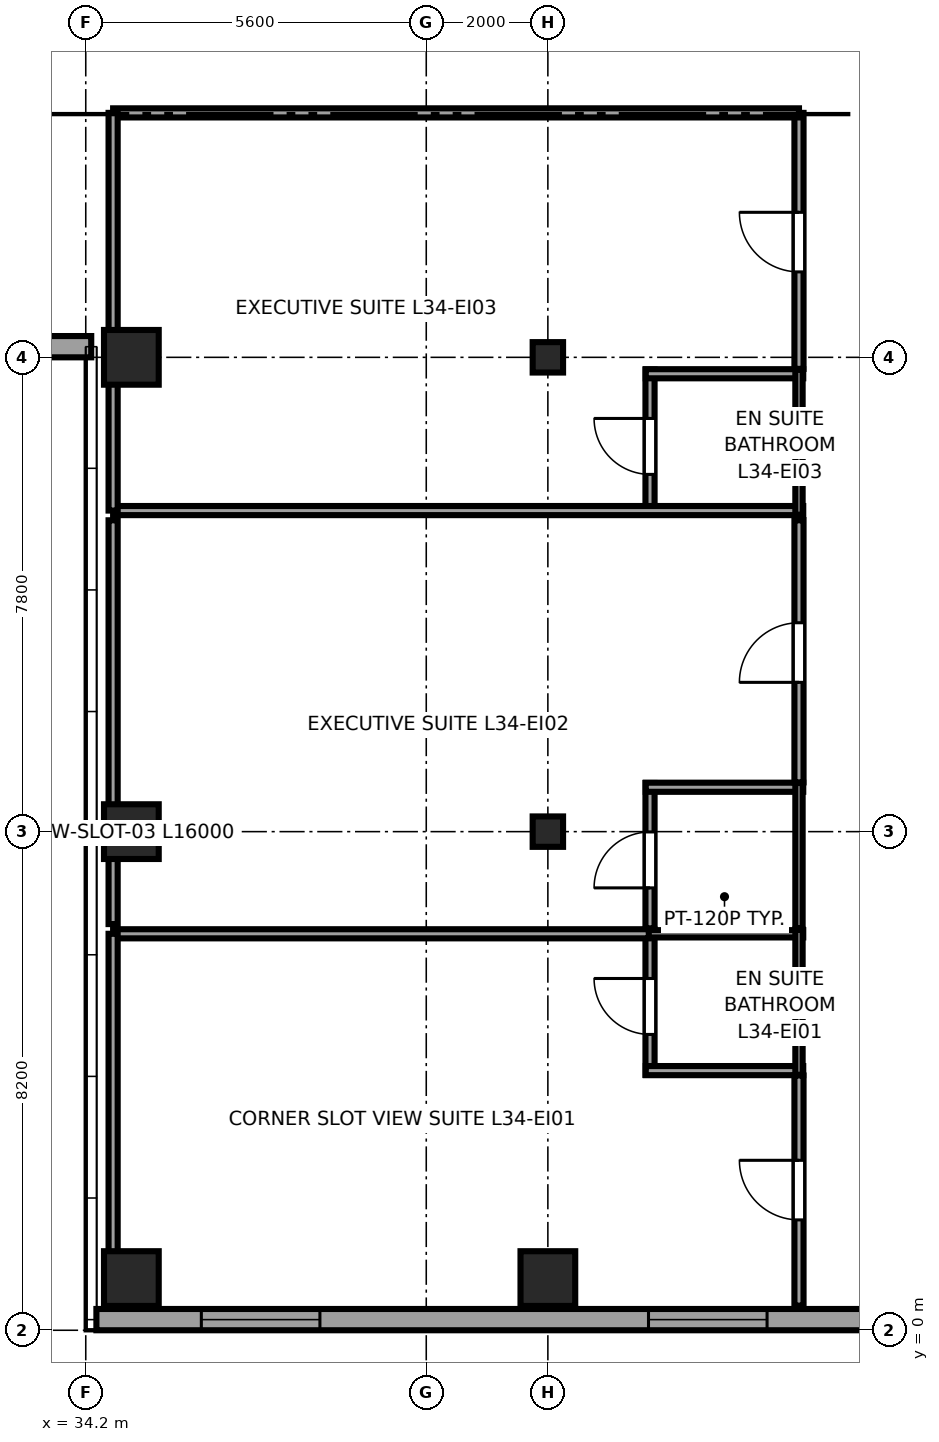
"""IFC4 building model, lengths in metres.
Left out: names, types, materials, properties, quantities, classifications, styles, units other than length and angle.
Written with IfcOpenShell. Run it as: python <this file> out.ifc"""

import sys

from ifc_helpers import new_model, si_unit, direction, frame, frame_2d, origin, origin_2d, place, context, subcontext, project, spatial, rectangle, i_section, extrude, source, transform, mapped, element, fill, save


model = new_model("IFC4")
c1 = context("Model", 3, precision=1e-05, world=origin(), true_north=direction((0.0, 1.0)))
c2 = subcontext(c1, "Body", "Model", "MODEL_VIEW")
j1 = project(units=[si_unit("LENGTHUNIT", "METRE"), si_unit("PLANEANGLEUNIT", "RADIAN")], contexts=[c1])
p1 = place(None, origin())
s1 = spatial("IfcSite", under=j1, at=p1, CompositionType="ELEMENT")
p2 = place(p1, origin())
s2 = spatial("IfcBuilding", under=s1, at=p2, CompositionType="ELEMENT")
p3 = place(p2, frame((0.0, 0.0, 132.85)))
s3 = spatial("IfcBuildingStorey", under=s2, at=p3, CompositionType="ELEMENT", Elevation=132.85)
m1 = source(origin(), c2, "Body", "SweptSolid", [
    extrude(rectangle(XDim=0.9, YDim=0.9, at=origin_2d()), origin(), (0.0, 0.0, 1.0), 3.55),
])
for number, where, z_axis, x_axis in (
    (1, (34.95, 0.85, 0.0), (0.0, 0.0, 1.0), (1.0, 0.0, 0.0)),
    (2, (34.95, 8.2, 0.0), (0.0, 0.0, 1.0), (1.0, 0.0, 0.0)),
    (3, (34.95, 16.0, 0.0), (0.0, 0.0, 1.0), (1.0, 0.0, 0.0)),
    (4, (41.8, 0.85, 0.0), (0.0, 0.0, 1.0), (1.0, 0.0, 0.0)),
):
    element("IfcColumn", number, at=place(p3, frame(where, z_axis=z_axis, x_axis=x_axis)), inside=s3, PredefinedType="COLUMN", context=c2, shape_type="MappedRepresentation", body=[
        mapped(m1, transform((0.0, 0.0, 0.0), x_axis=(1.0, 0.0, 0.0), y_axis=(0.0, 1.0, 0.0), z_axis=(0.0, 0.0, 1.0), scale=1.0)),
    ])
m2 = source(origin(), c2, "Body", "SweptSolid", [
    extrude(i_section(OverallWidth=0.5, OverallDepth=0.5, WebThickness=0.022, FlangeThickness=0.034, at=origin_2d()), origin(), (0.0, 0.0, 1.0), 3.55),
])
for number, where, z_axis, x_axis in (
    (5, (41.8, 8.2, 0.0), (0.0, 0.0, 1.0), (1.0, 0.0, 0.0)),
    (6, (41.8, 16.0, 0.0), (0.0, 0.0, 1.0), (1.0, 0.0, 0.0)),
):
    element("IfcColumn", number, at=place(p3, frame(where, z_axis=z_axis, x_axis=x_axis)), inside=s3, PredefinedType="COLUMN", context=c2, shape_type="MappedRepresentation", body=[
        mapped(m2, transform((0.0, 0.0, 0.0), x_axis=(1.0, 0.0, 0.0), y_axis=(0.0, 1.0, 0.0), z_axis=(0.0, 0.0, 1.0), scale=1.0)),
    ])
p4 = place(p3, frame((22.71, 16.175, 0.0), z_axis=(0.0, 0.0, 1.0), x_axis=(1.0, 0.0, 0.0)))
e7 = element("IfcWall", 7, at=p4, inside=s3, PredefinedType="SOLIDWALL", context=c2, shape_type="SweptSolid", body=[
    extrude(rectangle(XDim=11.58, YDim=0.35, at=frame_2d((5.79, 0.0))), origin(), (0.0, 0.0, 1.0), 2.748),
])
p5 = place(p4, frame((2.22, 0.0, 0.68)))
e8 = element("IfcOpeningElement", 8, at=p5, cuts=e7, PredefinedType="OPENING", context=c2, shape_type="SweptSolid", body=[
    extrude(rectangle(XDim=1.95, YDim=1.82, at=frame_2d((0.975, 0.91))), frame((0.0, 0.185, 0.0), z_axis=(0.0, -1.0, 0.0), x_axis=(1.0, 0.0, 0.0)), (0.0, 0.0, 1.0), 0.37),
])
p6 = place(p4, frame((7.41, 0.0, 0.68)))
e9 = element("IfcOpeningElement", 9, at=p6, cuts=e7, PredefinedType="OPENING", context=c2, shape_type="SweptSolid", body=[
    extrude(rectangle(XDim=1.95, YDim=1.82, at=frame_2d((0.975, 0.91))), frame((0.0, 0.185, 0.0), z_axis=(0.0, -1.0, 0.0), x_axis=(1.0, 0.0, 0.0)), (0.0, 0.0, 1.0), 0.37),
])
p7 = place(p3, frame((34.375, 0.175, 0.0), z_axis=(0.0, 0.0, 1.0), x_axis=(1.0, 0.0, 0.0)))
e10 = element("IfcWall", 10, at=p7, inside=s3, PredefinedType="SOLIDWALL", context=c2, shape_type="SweptSolid", body=[
    extrude(rectangle(XDim=18.008, YDim=0.35, at=frame_2d((9.004, 0.0))), origin(), (0.0, 0.0, 1.0), 3.37),
])
p8 = place(p7, frame((1.726, 0.0, 0.68)))
e11 = element("IfcOpeningElement", 11, at=p8, cuts=e10, PredefinedType="OPENING", context=c2, shape_type="SweptSolid", body=[
    extrude(rectangle(XDim=1.95, YDim=1.82, at=frame_2d((0.975, 0.91))), frame((0.0, 0.185, 0.0), z_axis=(0.0, -1.0, 0.0), x_axis=(1.0, 0.0, 0.0)), (0.0, 0.0, 1.0), 0.37),
])
p9 = place(p7, frame((9.08, 0.0, 0.68)))
e12 = element("IfcOpeningElement", 12, at=p9, cuts=e10, PredefinedType="OPENING", context=c2, shape_type="SweptSolid", body=[
    extrude(rectangle(XDim=1.95, YDim=1.82, at=frame_2d((0.975, 0.91))), frame((0.0, 0.185, 0.0), z_axis=(0.0, -1.0, 0.0), x_axis=(1.0, 0.0, 0.0)), (0.0, 0.0, 1.0), 0.37),
])
p10 = place(p7, frame((14.991, 0.0, 0.62)))
e13 = element("IfcOpeningElement", 13, at=p10, cuts=e10, PredefinedType="OPENING", context=c2, shape_type="SweptSolid", body=[
    extrude(rectangle(XDim=1.5, YDim=1.55, at=frame_2d((0.75, 0.775))), frame((0.0, 0.185, 0.0), z_axis=(0.0, -1.0, 0.0), x_axis=(1.0, 0.0, 0.0)), (0.0, 0.0, 1.0), 0.37),
])
p11 = place(p3, frame((43.48, 4.2, 0.0), z_axis=(0.0, 0.0, 1.0), x_axis=(0.0, 1.0, 0.0)))
e14 = element("IfcWall", 14, at=p11, inside=s3, PredefinedType="PARTITIONING", context=c2, shape_type="SweptSolid", body=[
    extrude(rectangle(XDim=2.39, YDim=0.15, at=frame_2d((1.195, 0.0))), origin(), (0.0, 0.0, 1.0), 3.37),
])
p12 = place(p11, frame((0.665, 0.0, 0.0)))
e15 = element("IfcOpeningElement", 15, at=p12, cuts=e14, PredefinedType="OPENING", context=c2, shape_type="SweptSolid", body=[
    extrude(rectangle(XDim=0.92, YDim=2.01, at=frame_2d((0.46, 1.005))), frame((0.0, 0.085, 0.0), z_axis=(0.0, -1.0, 0.0), x_axis=(1.0, 0.0, 0.0)), (0.0, 0.0, 1.0), 0.17),
])
p13 = place(p3, frame((43.41, 4.27, 0.0), z_axis=(0.0, 0.0, 1.0), x_axis=(1.0, 0.0, 0.0)))
e16 = element("IfcWall", 16, at=p13, inside=s3, PredefinedType="PARTITIONING", context=c2, shape_type="SweptSolid", body=[
    extrude(rectangle(XDim=2.59, YDim=0.15, at=frame_2d((1.295, 0.0))), origin(), (0.0, 0.0, 1.0), 3.37),
])
p14 = place(p3, frame((43.41, 6.52, 0.0), z_axis=(0.0, 0.0, 1.0), x_axis=(1.0, 0.0, 0.0)))
e17 = element("IfcWall", 17, at=p14, inside=s3, PredefinedType="PLUMBINGWALL", context=c2, shape_type="SweptSolid", body=[
    extrude(rectangle(XDim=2.59, YDim=0.12, at=frame_2d((1.295, 0.0))), origin(), (0.0, 0.0, 1.0), 3.37),
])
p15 = place(p3, frame((45.93, 4.2, 0.0), z_axis=(0.0, 0.0, 1.0), x_axis=(0.0, 1.0, 0.0)))
e18 = element("IfcWall", 18, at=p15, inside=s3, PredefinedType="PLUMBINGWALL", context=c2, shape_type="SweptSolid", body=[
    extrude(rectangle(XDim=2.39, YDim=0.12, at=frame_2d((1.195, 0.0))), origin(), (0.0, 0.0, 1.0), 3.37),
])
p16 = place(p3, frame((43.48, 6.61, 0.0), z_axis=(0.0, 0.0, 1.0), x_axis=(0.0, 1.0, 0.0)))
e19 = element("IfcWall", 19, at=p16, inside=s3, PredefinedType="PARTITIONING", context=c2, shape_type="SweptSolid", body=[
    extrude(rectangle(XDim=2.39, YDim=0.15, at=frame_2d((1.195, 0.0))), origin(), (0.0, 0.0, 1.0), 3.37),
])
p17 = place(p16, frame((0.665, 0.0, 0.0)))
e20 = element("IfcOpeningElement", 20, at=p17, cuts=e19, PredefinedType="OPENING", context=c2, shape_type="SweptSolid", body=[
    extrude(rectangle(XDim=0.92, YDim=2.01, at=frame_2d((0.46, 1.005))), frame((0.0, 0.085, 0.0), z_axis=(0.0, -1.0, 0.0), x_axis=(1.0, 0.0, 0.0)), (0.0, 0.0, 1.0), 0.17),
])
p18 = place(p3, frame((43.41, 8.93, 0.0), z_axis=(0.0, 0.0, 1.0), x_axis=(1.0, 0.0, 0.0)))
e21 = element("IfcWall", 21, at=p18, inside=s3, PredefinedType="PARTITIONING", context=c2, shape_type="SweptSolid", body=[
    extrude(rectangle(XDim=2.59, YDim=0.15, at=frame_2d((1.295, 0.0))), origin(), (0.0, 0.0, 1.0), 3.37),
])
p19 = place(p3, frame((45.93, 6.61, 0.0), z_axis=(0.0, 0.0, 1.0), x_axis=(0.0, 1.0, 0.0)))
e22 = element("IfcWall", 22, at=p19, inside=s3, PredefinedType="PLUMBINGWALL", context=c2, shape_type="SweptSolid", body=[
    extrude(rectangle(XDim=2.39, YDim=0.12, at=frame_2d((1.195, 0.0))), origin(), (0.0, 0.0, 1.0), 3.37),
])
p20 = place(p3, frame((43.48, 13.41, 0.0), z_axis=(0.0, 0.0, 1.0), x_axis=(0.0, 1.0, 0.0)))
e23 = element("IfcWall", 23, at=p20, inside=s3, PredefinedType="PARTITIONING", context=c2, shape_type="SweptSolid", body=[
    extrude(rectangle(XDim=2.39, YDim=0.15, at=frame_2d((1.195, 0.0))), origin(), (0.0, 0.0, 1.0), 3.37),
])
p21 = place(p20, frame((0.665, 0.0, 0.0)))
e24 = element("IfcOpeningElement", 24, at=p21, cuts=e23, PredefinedType="OPENING", context=c2, shape_type="SweptSolid", body=[
    extrude(rectangle(XDim=0.92, YDim=2.01, at=frame_2d((0.46, 1.005))), frame((0.0, 0.085, 0.0), z_axis=(0.0, -1.0, 0.0), x_axis=(1.0, 0.0, 0.0)), (0.0, 0.0, 1.0), 0.17),
])
p22 = place(p3, frame((34.65, 13.48, 0.0), z_axis=(0.0, 0.0, 1.0), x_axis=(1.0, 0.0, 0.0)))
e25 = element("IfcWall", 25, at=p22, inside=s3, PredefinedType="PARTITIONING", context=c2, shape_type="SweptSolid", body=[
    extrude(rectangle(XDim=11.35, YDim=0.15, at=frame_2d((5.675, 0.0))), origin(), (0.0, 0.0, 1.0), 3.37),
])
p23 = place(p3, frame((43.41, 15.73, 0.0), z_axis=(0.0, 0.0, 1.0), x_axis=(1.0, 0.0, 0.0)))
e26 = element("IfcWall", 26, at=p23, inside=s3, PredefinedType="PARTITIONING", context=c2, shape_type="SweptSolid", body=[
    extrude(rectangle(XDim=2.59, YDim=0.15, at=frame_2d((1.295, 0.0))), origin(), (0.0, 0.0, 1.0), 3.37),
])
p24 = place(p3, frame((45.93, 13.41, 0.0), z_axis=(0.0, 0.0, 1.0), x_axis=(0.0, 1.0, 0.0)))
e27 = element("IfcWall", 27, at=p24, inside=s3, PredefinedType="PLUMBINGWALL", context=c2, shape_type="SweptSolid", body=[
    extrude(rectangle(XDim=2.39, YDim=0.12, at=frame_2d((1.195, 0.0))), origin(), (0.0, 0.0, 1.0), 3.37),
])
p25 = place(p3, frame((45.93, 0.405, 0.0), z_axis=(0.0, 0.0, 1.0), x_axis=(0.0, 1.0, 0.0)))
e28 = element("IfcWall", 28, at=p25, inside=s3, PredefinedType="PARTITIONING", context=c2, shape_type="SweptSolid", body=[
    extrude(rectangle(XDim=3.785, YDim=0.15, at=frame_2d((1.893, 0.0))), origin(), (0.0, 0.0, 1.0), 3.37),
])
p26 = place(p25, frame((1.41, 0.0, 0.0)))
e29 = element("IfcOpeningElement", 29, at=p26, cuts=e28, PredefinedType="OPENING", context=c2, shape_type="SweptSolid", body=[
    extrude(rectangle(XDim=0.98, YDim=2.12, at=frame_2d((0.49, 1.06))), frame((0.0, 0.085, 0.0), z_axis=(0.0, -1.0, 0.0), x_axis=(1.0, 0.0, 0.0)), (0.0, 0.0, 1.0), 0.17),
])
p27 = place(p3, frame((34.65, 6.52, 0.0), z_axis=(0.0, 0.0, 1.0), x_axis=(1.0, 0.0, 0.0)))
e30 = element("IfcWall", 30, at=p27, inside=s3, PredefinedType="PARTITIONING", context=c2, shape_type="SweptSolid", body=[
    extrude(rectangle(XDim=8.81, YDim=0.15, at=frame_2d((4.405, 0.0))), origin(), (0.0, 0.0, 1.0), 3.37),
])
p28 = place(p3, frame((34.65, 0.405, 0.0), z_axis=(0.0, 0.0, 1.0), x_axis=(0.0, 1.0, 0.0)))
e31 = element("IfcWall", 31, at=p28, inside=s3, PredefinedType="PARTITIONING", context=c2, shape_type="SweptSolid", body=[
    extrude(rectangle(XDim=6.115, YDim=0.15, at=frame_2d((3.058, 0.0))), origin(), (0.0, 0.0, 1.0), 3.37),
])
p29 = place(p3, frame((45.93, 9.01, 0.0), z_axis=(0.0, 0.0, 1.0), x_axis=(0.0, 1.0, 0.0)))
e32 = element("IfcWall", 32, at=p29, inside=s3, PredefinedType="PARTITIONING", context=c2, shape_type="SweptSolid", body=[
    extrude(rectangle(XDim=4.31, YDim=0.15, at=frame_2d((2.155, 0.0))), origin(), (0.0, 0.0, 1.0), 3.37),
])
p30 = place(p29, frame((1.645, 0.0, 0.0)))
e33 = element("IfcOpeningElement", 33, at=p30, cuts=e32, PredefinedType="OPENING", context=c2, shape_type="SweptSolid", body=[
    extrude(rectangle(XDim=0.98, YDim=2.12, at=frame_2d((0.49, 1.06))), frame((0.0, 0.085, 0.0), z_axis=(0.0, -1.0, 0.0), x_axis=(1.0, 0.0, 0.0)), (0.0, 0.0, 1.0), 0.17),
])
p31 = place(p3, frame((34.65, 6.68, 0.0), z_axis=(0.0, 0.0, 1.0), x_axis=(0.0, 1.0, 0.0)))
e34 = element("IfcWall", 34, at=p31, inside=s3, PredefinedType="PARTITIONING", context=c2, shape_type="SweptSolid", body=[
    extrude(rectangle(XDim=6.64, YDim=0.15, at=frame_2d((3.32, 0.0))), origin(), (0.0, 0.0, 1.0), 3.37),
])
p32 = place(p3, frame((45.93, 15.81, 0.0), z_axis=(0.0, 0.0, 1.0), x_axis=(0.0, 1.0, 0.0)))
e35 = element("IfcWall", 35, at=p32, inside=s3, PredefinedType="PARTITIONING", context=c2, shape_type="SweptSolid", body=[
    extrude(rectangle(XDim=4.21, YDim=0.15, at=frame_2d((2.105, 0.0))), origin(), (0.0, 0.0, 1.0), 3.37),
])
p33 = place(p32, frame((1.595, 0.0, 0.0)))
e36 = element("IfcOpeningElement", 36, at=p33, cuts=e35, PredefinedType="OPENING", context=c2, shape_type="SweptSolid", body=[
    extrude(rectangle(XDim=0.98, YDim=2.12, at=frame_2d((0.49, 1.06))), frame((0.0, 0.085, 0.0), z_axis=(0.0, -1.0, 0.0), x_axis=(1.0, 0.0, 0.0)), (0.0, 0.0, 1.0), 0.17),
])
p34 = place(p3, frame((34.65, 20.02, 0.0), z_axis=(0.0, 0.0, 1.0), x_axis=(1.0, 0.0, 0.0)))
e37 = element("IfcWall", 37, at=p34, inside=s3, PredefinedType="PARTITIONING", context=c2, shape_type="SweptSolid", body=[
    extrude(rectangle(XDim=11.28, YDim=0.15, at=frame_2d((5.64, 0.0))), origin(), (0.0, 0.0, 1.0), 2.954),
])
p35 = place(p3, frame((34.65, 13.48, 0.0), z_axis=(0.0, 0.0, 1.0), x_axis=(0.0, 1.0, 0.0)))
e38 = element("IfcWall", 38, at=p35, inside=s3, PredefinedType="PARTITIONING", context=c2, shape_type="SweptSolid", body=[
    extrude(rectangle(XDim=6.54, YDim=0.15, at=frame_2d((3.27, 0.0))), origin(), (0.0, 0.0, 1.0), 3.37),
])
m3 = source(origin(), c2, "Body", "SweptSolid", [
    extrude(rectangle(XDim=1.95, YDim=1.82, at=frame_2d((0.975, 0.91))), frame((0.0, 0.09, 0.0), z_axis=(0.0, -1.0, 0.0), x_axis=(1.0, 0.0, 0.0)), (0.0, 0.0, 1.0), 0.06),
])
p36 = place(p8, origin())
e39 = element("IfcWindow", 39, at=p36, inside=s3, PartitioningType="DOUBLE_PANEL_VERTICAL", PredefinedType="WINDOW", context=c2, shape_type="MappedRepresentation", body=[
    mapped(m3, transform((0.0, 0.0, 0.0), x_axis=(1.0, 0.0, 0.0), y_axis=(0.0, 1.0, 0.0), z_axis=(0.0, 0.0, 1.0), scale=1.0)),
])
fill(e11, e39)
p37 = place(p9, origin())
e40 = element("IfcWindow", 40, at=p37, inside=s3, PartitioningType="DOUBLE_PANEL_VERTICAL", PredefinedType="WINDOW", context=c2, shape_type="MappedRepresentation", body=[
    mapped(m3, transform((0.0, 0.0, 0.0), x_axis=(1.0, 0.0, 0.0), y_axis=(0.0, 1.0, 0.0), z_axis=(0.0, 0.0, 1.0), scale=1.0)),
])
fill(e12, e40)
m4 = source(origin(), c2, "Body", "SweptSolid", [
    extrude(rectangle(XDim=0.92, YDim=2.01, at=frame_2d((0.46, 1.005))), frame((0.0, 0.025, 0.0), z_axis=(0.0, -1.0, 0.0), x_axis=(1.0, 0.0, 0.0)), (0.0, 0.0, 1.0), 0.05),
])
p38 = place(p12, origin())
e41 = element("IfcDoor", 41, at=p38, inside=s3, OperationType="SINGLE_SWING_RIGHT", PredefinedType="DOOR", context=c2, shape_type="MappedRepresentation", body=[
    mapped(m4, transform((0.0, 0.0, 0.0), x_axis=(1.0, 0.0, 0.0), y_axis=(0.0, 1.0, 0.0), z_axis=(0.0, 0.0, 1.0), scale=1.0)),
])
fill(e15, e41)
p39 = place(p17, origin())
e42 = element("IfcDoor", 42, at=p39, inside=s3, OperationType="SINGLE_SWING_LEFT", PredefinedType="DOOR", context=c2, shape_type="MappedRepresentation", body=[
    mapped(m4, transform((0.0, 0.0, 0.0), x_axis=(1.0, 0.0, 0.0), y_axis=(0.0, 1.0, 0.0), z_axis=(0.0, 0.0, 1.0), scale=1.0)),
])
fill(e20, e42)
p40 = place(p21, origin())
e43 = element("IfcDoor", 43, at=p40, inside=s3, OperationType="SINGLE_SWING_RIGHT", PredefinedType="DOOR", context=c2, shape_type="MappedRepresentation", body=[
    mapped(m4, transform((0.0, 0.0, 0.0), x_axis=(1.0, 0.0, 0.0), y_axis=(0.0, 1.0, 0.0), z_axis=(0.0, 0.0, 1.0), scale=1.0)),
])
fill(e24, e43)
m5 = source(origin(), c2, "Body", "SweptSolid", [
    extrude(rectangle(XDim=0.98, YDim=2.12, at=frame_2d((0.49, 1.06))), frame((0.0, 0.025, 0.0), z_axis=(0.0, -1.0, 0.0), x_axis=(1.0, 0.0, 0.0)), (0.0, 0.0, 1.0), 0.05),
])
p41 = place(p26, origin())
e44 = element("IfcDoor", 44, at=p41, inside=s3, OperationType="SINGLE_SWING_RIGHT", PredefinedType="DOOR", context=c2, shape_type="MappedRepresentation", body=[
    mapped(m5, transform((0.0, 0.0, 0.0), x_axis=(1.0, 0.0, 0.0), y_axis=(0.0, 1.0, 0.0), z_axis=(0.0, 0.0, 1.0), scale=1.0)),
])
fill(e29, e44)
p42 = place(p30, origin())
e45 = element("IfcDoor", 45, at=p42, inside=s3, OperationType="SINGLE_SWING_LEFT", PredefinedType="DOOR", context=c2, shape_type="MappedRepresentation", body=[
    mapped(m5, transform((0.0, 0.0, 0.0), x_axis=(1.0, 0.0, 0.0), y_axis=(0.0, 1.0, 0.0), z_axis=(0.0, 0.0, 1.0), scale=1.0)),
])
fill(e33, e45)
p43 = place(p33, origin())
e46 = element("IfcDoor", 46, at=p43, inside=s3, OperationType="SINGLE_SWING_RIGHT", PredefinedType="DOOR", context=c2, shape_type="MappedRepresentation", body=[
    mapped(m5, transform((0.0, 0.0, 0.0), x_axis=(1.0, 0.0, 0.0), y_axis=(0.0, 1.0, 0.0), z_axis=(0.0, 0.0, 1.0), scale=1.0)),
])
fill(e36, e46)
save(model, sys.argv[1])
